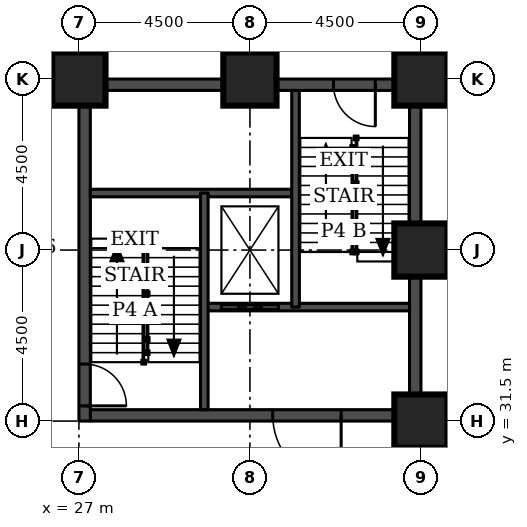
"""IFC4 building model, lengths in metres.
Left out: names, types, materials, properties, quantities, classifications, styles, units other than length and angle.
Written with IfcOpenShell. Run it as: python <this file> out.ifc"""

import sys

from ifc_helpers import new_model, si_unit, direction, frame, frame_2d, origin, origin_2d, place, context, subcontext, project, spatial, rectangle, extrude, element, fill, save


model = new_model("IFC4")
c1 = context("Model", 3, precision=1e-05, world=origin(), true_north=direction((0.0, 1.0)))
c2 = subcontext(c1, "Body", "Model", "MODEL_VIEW")
j1 = project(units=[si_unit("LENGTHUNIT", "METRE"), si_unit("PLANEANGLEUNIT", "RADIAN")], contexts=[c1])
p1 = place(None, origin())
s1 = spatial("IfcSite", under=j1, at=p1, CompositionType="ELEMENT")
p2 = place(p1, origin())
s2 = spatial("IfcBuilding", under=s1, at=p2, CompositionType="ELEMENT")
p3 = place(p2, frame((0.0, 0.0, -9.0)))
s3 = spatial("IfcBuildingStorey", under=s2, at=p3, CompositionType="ELEMENT", Elevation=-9.0)
for number, where, z_axis, x_axis in (
    (1, (36.0, 31.5, 0.0), (0.0, 0.0, 1.0), (1.0, 0.0, 0.0)),
    (2, (36.0, 36.0, 0.0), (0.0, 0.0, 1.0), (1.0, 0.0, 0.0)),
    (3, (27.0, 40.5, 0.0), (0.0, 0.0, 1.0), (1.0, 0.0, 0.0)),
    (4, (31.5, 40.5, 0.0), (0.0, 0.0, 1.0), (1.0, 0.0, 0.0)),
    (5, (36.0, 40.5, 0.0), (0.0, 0.0, 1.0), (1.0, 0.0, 0.0)),
):
    element("IfcColumn", number, at=place(p3, frame(where, z_axis=z_axis, x_axis=x_axis)), inside=s3, PredefinedType="COLUMN", context=c2, shape_type="SweptSolid", body=[
        extrude(rectangle(XDim=1.4, YDim=1.4, at=origin_2d()), origin(), (0.0, 0.0, 1.0), 4.5),
    ])
p4 = place(p3, frame((27.3, 31.65, 0.0), z_axis=(0.0, 0.0, 1.0), x_axis=(1.0, 0.0, 0.0)))
e6 = element("IfcWall", 6, at=p4, inside=s3, PredefinedType="SHEAR", context=c2, shape_type="SweptSolid", body=[
    extrude(rectangle(XDim=8.4, YDim=0.3, at=frame_2d((4.2, 0.0))), origin(), (0.0, 0.0, 1.0), 4.5),
])
p5 = place(p4, frame((4.8, 0.0, 0.0)))
e7 = element("IfcOpeningElement", 7, at=p5, cuts=e6, PredefinedType="OPENING", context=c2, shape_type="SweptSolid", body=[
    extrude(rectangle(XDim=1.8, YDim=2.1, at=frame_2d((0.9, 1.05))), frame((0.0, 0.16, 0.0), z_axis=(0.0, -1.0, 0.0), x_axis=(1.0, 0.0, 0.0)), (0.0, 0.0, 1.0), 0.32),
])
p6 = place(p3, frame((27.3, 40.35, 0.0), z_axis=(0.0, 0.0, 1.0), x_axis=(1.0, 0.0, 0.0)))
e8 = element("IfcWall", 8, at=p6, inside=s3, PredefinedType="SHEAR", context=c2, shape_type="SweptSolid", body=[
    extrude(rectangle(XDim=8.4, YDim=0.3, at=frame_2d((4.2, 0.0))), origin(), (0.0, 0.0, 1.0), 4.5),
])
p7 = place(p6, frame((6.4, 0.0, 0.0)))
e9 = element("IfcOpeningElement", 9, at=p7, cuts=e8, PredefinedType="OPENING", context=c2, shape_type="SweptSolid", body=[
    extrude(rectangle(XDim=1.1, YDim=2.1, at=frame_2d((0.55, 1.05))), frame((0.0, 0.16, 0.0), z_axis=(0.0, -1.0, 0.0), x_axis=(1.0, 0.0, 0.0)), (0.0, 0.0, 1.0), 0.32),
])
p8 = place(p3, frame((27.15, 31.5, 0.0), z_axis=(0.0, 0.0, 1.0), x_axis=(0.0, 1.0, 0.0)))
e10 = element("IfcWall", 10, at=p8, inside=s3, PredefinedType="SHEAR", context=c2, shape_type="SweptSolid", body=[
    extrude(rectangle(XDim=9.0, YDim=0.3, at=frame_2d((4.5, 0.0))), origin(), (0.0, 0.0, 1.0), 4.5),
])
p9 = place(p8, frame((0.4, 0.0, 0.0)))
e11 = element("IfcOpeningElement", 11, at=p9, cuts=e10, PredefinedType="OPENING", context=c2, shape_type="SweptSolid", body=[
    extrude(rectangle(XDim=1.1, YDim=2.1, at=frame_2d((0.55, 1.05))), frame((0.0, 0.16, 0.0), z_axis=(0.0, -1.0, 0.0), x_axis=(1.0, 0.0, 0.0)), (0.0, 0.0, 1.0), 0.32),
])
p10 = place(p3, frame((35.85, 31.5, 0.0), z_axis=(0.0, 0.0, 1.0), x_axis=(0.0, 1.0, 0.0)))
e12 = element("IfcWall", 12, at=p10, inside=s3, PredefinedType="SHEAR", context=c2, shape_type="SweptSolid", body=[
    extrude(rectangle(XDim=9.0, YDim=0.3, at=frame_2d((4.5, 0.0))), origin(), (0.0, 0.0, 1.0), 4.5),
])
p11 = place(p3, frame((30.3, 34.5, 0.0), z_axis=(0.0, 0.0, 1.0), x_axis=(1.0, 0.0, 0.0)))
e13 = element("IfcWall", 13, at=p11, inside=s3, PredefinedType="SOLIDWALL", context=c2, shape_type="SweptSolid", body=[
    extrude(rectangle(XDim=5.4, YDim=0.2, at=frame_2d((2.7, 0.0))), origin(), (0.0, 0.0, 1.0), 4.1),
])
p12 = place(p11, frame((0.45, 0.0, 0.0)))
e14 = element("IfcOpeningElement", 14, at=p12, cuts=e13, PredefinedType="OPENING", context=c2, shape_type="SweptSolid", body=[
    extrude(rectangle(XDim=1.5, YDim=2.1, at=frame_2d((0.75, 1.05))), frame((0.0, 0.11, 0.0), z_axis=(0.0, -1.0, 0.0), x_axis=(1.0, 0.0, 0.0)), (0.0, 0.0, 1.0), 0.22),
])
p13 = place(p3, frame((27.3, 37.5, 0.0), z_axis=(0.0, 0.0, 1.0), x_axis=(1.0, 0.0, 0.0)))
e15 = element("IfcWall", 15, at=p13, inside=s3, PredefinedType="SOLIDWALL", context=c2, shape_type="SweptSolid", body=[
    extrude(rectangle(XDim=5.4, YDim=0.2, at=frame_2d((2.7, 0.0))), origin(), (0.0, 0.0, 1.0), 4.1),
])
for number, where, z_axis, x_axis in (
    (16, (30.3, 31.8, 0.0), (0.0, 0.0, 1.0), (0.0, 1.0, 0.0)),
    (17, (32.7, 34.5, 0.0), (0.0, 0.0, 1.0), (0.0, 1.0, 0.0)),
):
    element("IfcWall", number, at=place(p3, frame(where, z_axis=z_axis, x_axis=x_axis)), inside=s3, PredefinedType="SOLIDWALL", context=c2, shape_type="SweptSolid", body=[
        extrude(rectangle(XDim=5.7, YDim=0.2, at=frame_2d((2.85, 0.0))), origin(), (0.0, 0.0, 1.0), 4.1),
    ])
p14 = place(p9, frame((1.1, 0.0, 0.0), z_axis=(0.0, 0.0, 1.0), x_axis=(-1.0, 0.0, 0.0)))
e18 = element("IfcDoor", 18, at=p14, inside=s3, OperationType="SINGLE_SWING_RIGHT", PredefinedType="DOOR", context=c2, shape_type="SweptSolid", body=[
    extrude(rectangle(XDim=1.1, YDim=2.1, at=frame_2d((0.55, 1.05))), frame((0.0, 0.025, 0.0), z_axis=(0.0, -1.0, 0.0), x_axis=(1.0, 0.0, 0.0)), (0.0, 0.0, 1.0), 0.05),
])
fill(e11, e18)
p15 = place(p7, frame((1.1, 0.0, 0.0), z_axis=(0.0, 0.0, 1.0), x_axis=(-1.0, 0.0, 0.0)))
e19 = element("IfcDoor", 19, at=p15, inside=s3, OperationType="SINGLE_SWING_LEFT", PredefinedType="DOOR", context=c2, shape_type="SweptSolid", body=[
    extrude(rectangle(XDim=1.1, YDim=2.1, at=frame_2d((0.55, 1.05))), frame((0.0, 0.025, 0.0), z_axis=(0.0, -1.0, 0.0), x_axis=(1.0, 0.0, 0.0)), (0.0, 0.0, 1.0), 0.05),
])
fill(e9, e19)
p16 = place(p12, origin())
e20 = element("IfcDoor", 20, at=p16, inside=s3, OperationType="DOUBLE_DOOR_SLIDING", PredefinedType="DOOR", context=c2, shape_type="SweptSolid", body=[
    extrude(rectangle(XDim=1.5, YDim=2.1, at=frame_2d((0.75, 1.05))), frame((0.0, 0.025, 0.0), z_axis=(0.0, -1.0, 0.0), x_axis=(1.0, 0.0, 0.0)), (0.0, 0.0, 1.0), 0.05),
])
fill(e14, e20)
p17 = place(p5, frame((1.8, 0.0, 0.0), z_axis=(0.0, 0.0, 1.0), x_axis=(-1.0, 0.0, 0.0)))
e21 = element("IfcDoor", 21, at=p17, inside=s3, OperationType="SINGLE_SWING_LEFT", PredefinedType="DOOR", context=c2, shape_type="SweptSolid", body=[
    extrude(rectangle(XDim=1.8, YDim=2.1, at=frame_2d((0.9, 1.05))), frame((0.0, 0.025, 0.0), z_axis=(0.0, -1.0, 0.0), x_axis=(1.0, 0.0, 0.0)), (0.0, 0.0, 1.0), 0.05),
])
fill(e7, e21)
save(model, sys.argv[1])
